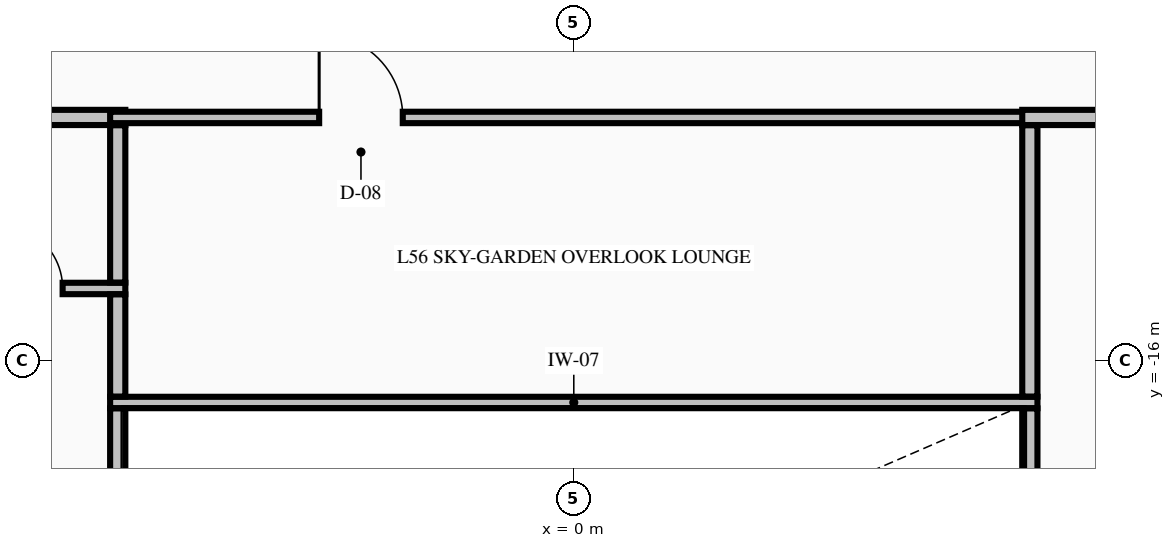
"""IFC4 building model, lengths in metres.
Left out: names, types, materials, properties, quantities, classifications, styles, units other than length and angle.
Written with IfcOpenShell. Run it as: python <this file> out.ifc"""

import sys

from ifc_helpers import new_model, si_unit, direction, frame, frame_2d, origin, place, context, subcontext, project, spatial, rectangle, extrude, element, fill, save


model = new_model("IFC4")
c1 = context("Model", 3, precision=1e-05, world=origin(), true_north=direction((0.0, 1.0)))
c2 = subcontext(c1, "Body", "Model", "MODEL_VIEW")
j1 = project(units=[si_unit("LENGTHUNIT", "METRE"), si_unit("PLANEANGLEUNIT", "RADIAN")], contexts=[c1])
p1 = place(None, origin())
s1 = spatial("IfcSite", under=j1, at=p1, CompositionType="ELEMENT")
p2 = place(p1, origin())
s2 = spatial("IfcBuilding", under=s1, at=p2, CompositionType="ELEMENT")
p3 = place(p2, frame((0.0, 0.0, 215.26)))
s3 = spatial("IfcBuildingStorey", under=s2, at=p3, CompositionType="ELEMENT", Elevation=215.26)
p4 = place(p3, frame((-6.1, -16.55, 0.0), z_axis=(0.0, 0.0, 1.0), x_axis=(1.0, 0.0, 0.0)))
e1 = element("IfcWall", 1, at=p4, inside=s3, PredefinedType="PARTITIONING", context=c2, shape_type="SweptSolid", body=[
    extrude(rectangle(XDim=12.2, YDim=0.15, at=frame_2d((6.1, 0.0))), origin(), (0.0, 0.0, 1.0), 3.15),
])
p5 = place(p3, frame((-8.375, -15.05, 0.0), z_axis=(0.0, 0.0, 1.0), x_axis=(1.0, 0.0, 0.0)))
e2 = element("IfcWall", 2, at=p5, inside=s3, PredefinedType="PARTITIONING", context=c2, shape_type="SweptSolid", body=[
    extrude(rectangle(XDim=2.475, YDim=0.15, at=frame_2d((1.238, 0.0))), origin(), (0.0, 0.0, 1.0), 3.15),
])
p6 = place(p5, frame((0.8, 0.0, 0.0)))
e3 = element("IfcOpeningElement", 3, at=p6, cuts=e2, PredefinedType="OPENING", context=c2, shape_type="SweptSolid", body=[
    extrude(rectangle(XDim=0.85, YDim=2.1, at=frame_2d((0.425, 1.05))), frame((0.0, 0.085, 0.0), z_axis=(0.0, -1.0, 0.0), x_axis=(1.0, 0.0, 0.0)), (0.0, 0.0, 1.0), 0.17),
])
p7 = place(p3, frame((-22.1, -12.8, 0.0), z_axis=(0.0, 0.0, 1.0), x_axis=(1.0, 0.0, 0.0)))
e4 = element("IfcWall", 4, at=p7, inside=s3, PredefinedType="PARTITIONING", context=c2, shape_type="SweptSolid", body=[
    extrude(rectangle(XDim=16.2, YDim=0.2, at=frame_2d((8.1, 0.0))), origin(), (0.0, 0.0, 1.0), 3.15),
])
p8 = place(p7, frame((7.575, 0.0, 0.0)))
e5 = element("IfcOpeningElement", 5, at=p8, cuts=e4, PredefinedType="OPENING", context=c2, shape_type="SweptSolid", body=[
    extrude(rectangle(XDim=0.95, YDim=2.15, at=frame_2d((0.475, 1.075))), frame((0.0, 0.11, 0.0), z_axis=(0.0, -1.0, 0.0), x_axis=(1.0, 0.0, 0.0)), (0.0, 0.0, 1.0), 0.22),
])
p9 = place(p3, frame((-6.1, -12.8, 0.0), z_axis=(0.0, 0.0, 1.0), x_axis=(1.0, 0.0, 0.0)))
e6 = element("IfcWall", 6, at=p9, inside=s3, PredefinedType="PARTITIONING", context=c2, shape_type="SweptSolid", body=[
    extrude(rectangle(XDim=12.2, YDim=0.15, at=frame_2d((6.1, 0.0))), origin(), (0.0, 0.0, 1.0), 3.15),
])
p10 = place(p9, frame((2.75, 0.0, 0.0)))
e7 = element("IfcOpeningElement", 7, at=p10, cuts=e6, PredefinedType="OPENING", context=c2, shape_type="SweptSolid", body=[
    extrude(rectangle(XDim=1.1, YDim=2.15, at=frame_2d((0.55, 1.075))), frame((0.0, 0.085, 0.0), z_axis=(0.0, -1.0, 0.0), x_axis=(1.0, 0.0, 0.0)), (0.0, 0.0, 1.0), 0.17),
])
p11 = place(p3, frame((5.9, -12.8, 0.0), z_axis=(0.0, 0.0, 1.0), x_axis=(1.0, 0.0, 0.0)))
e8 = element("IfcWall", 8, at=p11, inside=s3, PredefinedType="PARTITIONING", context=c2, shape_type="SweptSolid", body=[
    extrude(rectangle(XDim=11.2, YDim=0.2, at=frame_2d((5.6, 0.0))), origin(), (0.0, 0.0, 1.0), 3.15),
])
p12 = place(p11, frame((6.675, 0.0, 0.0)))
e9 = element("IfcOpeningElement", 9, at=p12, cuts=e8, PredefinedType="OPENING", context=c2, shape_type="SweptSolid", body=[
    extrude(rectangle(XDim=0.95, YDim=2.15, at=frame_2d((0.475, 1.075))), frame((0.0, 0.11, 0.0), z_axis=(0.0, -1.0, 0.0), x_axis=(1.0, 0.0, 0.0)), (0.0, 0.0, 1.0), 0.22),
])
p13 = place(p3, frame((-6.0, -21.672, 0.0), z_axis=(0.0, 0.0, 1.0), x_axis=(0.0, 1.0, 0.0)))
e10 = element("IfcWall", 10, at=p13, inside=s3, PredefinedType="PARTITIONING", context=c2, shape_type="SweptSolid", body=[
    extrude(rectangle(XDim=5.044, YDim=0.2, at=frame_2d((2.522, 0.0))), origin(), (0.0, 0.0, 1.0), 3.15),
])
p14 = place(p3, frame((-6.0, -16.472, 0.0), z_axis=(0.0, 0.0, 1.0), x_axis=(0.0, 1.0, 0.0)))
e11 = element("IfcWall", 11, at=p14, inside=s3, PredefinedType="PARTITIONING", context=c2, shape_type="SweptSolid", body=[
    extrude(rectangle(XDim=1.344, YDim=0.2, at=frame_2d((0.672, 0.0))), origin(), (0.0, 0.0, 1.0), 3.15),
])
p15 = place(p3, frame((-6.0, -14.972, 0.0), z_axis=(0.0, 0.0, 1.0), x_axis=(0.0, 1.0, 0.0)))
e12 = element("IfcWall", 12, at=p15, inside=s3, PredefinedType="PARTITIONING", context=c2, shape_type="SweptSolid", body=[
    extrude(rectangle(XDim=2.069, YDim=0.2, at=frame_2d((1.034, 0.0))), origin(), (0.0, 0.0, 1.0), 3.15),
])
p16 = place(p3, frame((6.0, -21.672, 0.0), z_axis=(0.0, 0.0, 1.0), x_axis=(0.0, 1.0, 0.0)))
e13 = element("IfcWall", 13, at=p16, inside=s3, PredefinedType="PARTITIONING", context=c2, shape_type="SweptSolid", body=[
    extrude(rectangle(XDim=5.044, YDim=0.2, at=frame_2d((2.522, 0.0))), origin(), (0.0, 0.0, 1.0), 3.15),
])
p17 = place(p3, frame((6.0, -16.472, 0.0), z_axis=(0.0, 0.0, 1.0), x_axis=(0.0, 1.0, 0.0)))
e14 = element("IfcWall", 14, at=p17, inside=s3, PredefinedType="PARTITIONING", context=c2, shape_type="SweptSolid", body=[
    extrude(rectangle(XDim=3.569, YDim=0.2, at=frame_2d((1.784, 0.0))), origin(), (0.0, 0.0, 1.0), 3.15),
])
p18 = place(p10, origin())
e15 = element("IfcDoor", 15, at=p18, inside=s3, OperationType="SINGLE_SWING_LEFT", PredefinedType="DOOR", context=c2, shape_type="SweptSolid", body=[
    extrude(rectangle(XDim=1.1, YDim=2.15, at=frame_2d((0.55, 1.075))), frame((0.0, 0.025, 0.0), z_axis=(0.0, -1.0, 0.0), x_axis=(1.0, 0.0, 0.0)), (0.0, 0.0, 1.0), 0.05),
])
fill(e7, e15)
p19 = place(p6, origin())
e16 = element("IfcDoor", 16, at=p19, inside=s3, OperationType="SINGLE_SWING_LEFT", PredefinedType="DOOR", context=c2, shape_type="SweptSolid", body=[
    extrude(rectangle(XDim=0.85, YDim=2.1, at=frame_2d((0.425, 1.05))), frame((0.0, 0.025, 0.0), z_axis=(0.0, -1.0, 0.0), x_axis=(1.0, 0.0, 0.0)), (0.0, 0.0, 1.0), 0.05),
])
fill(e3, e16)
save(model, sys.argv[1])
